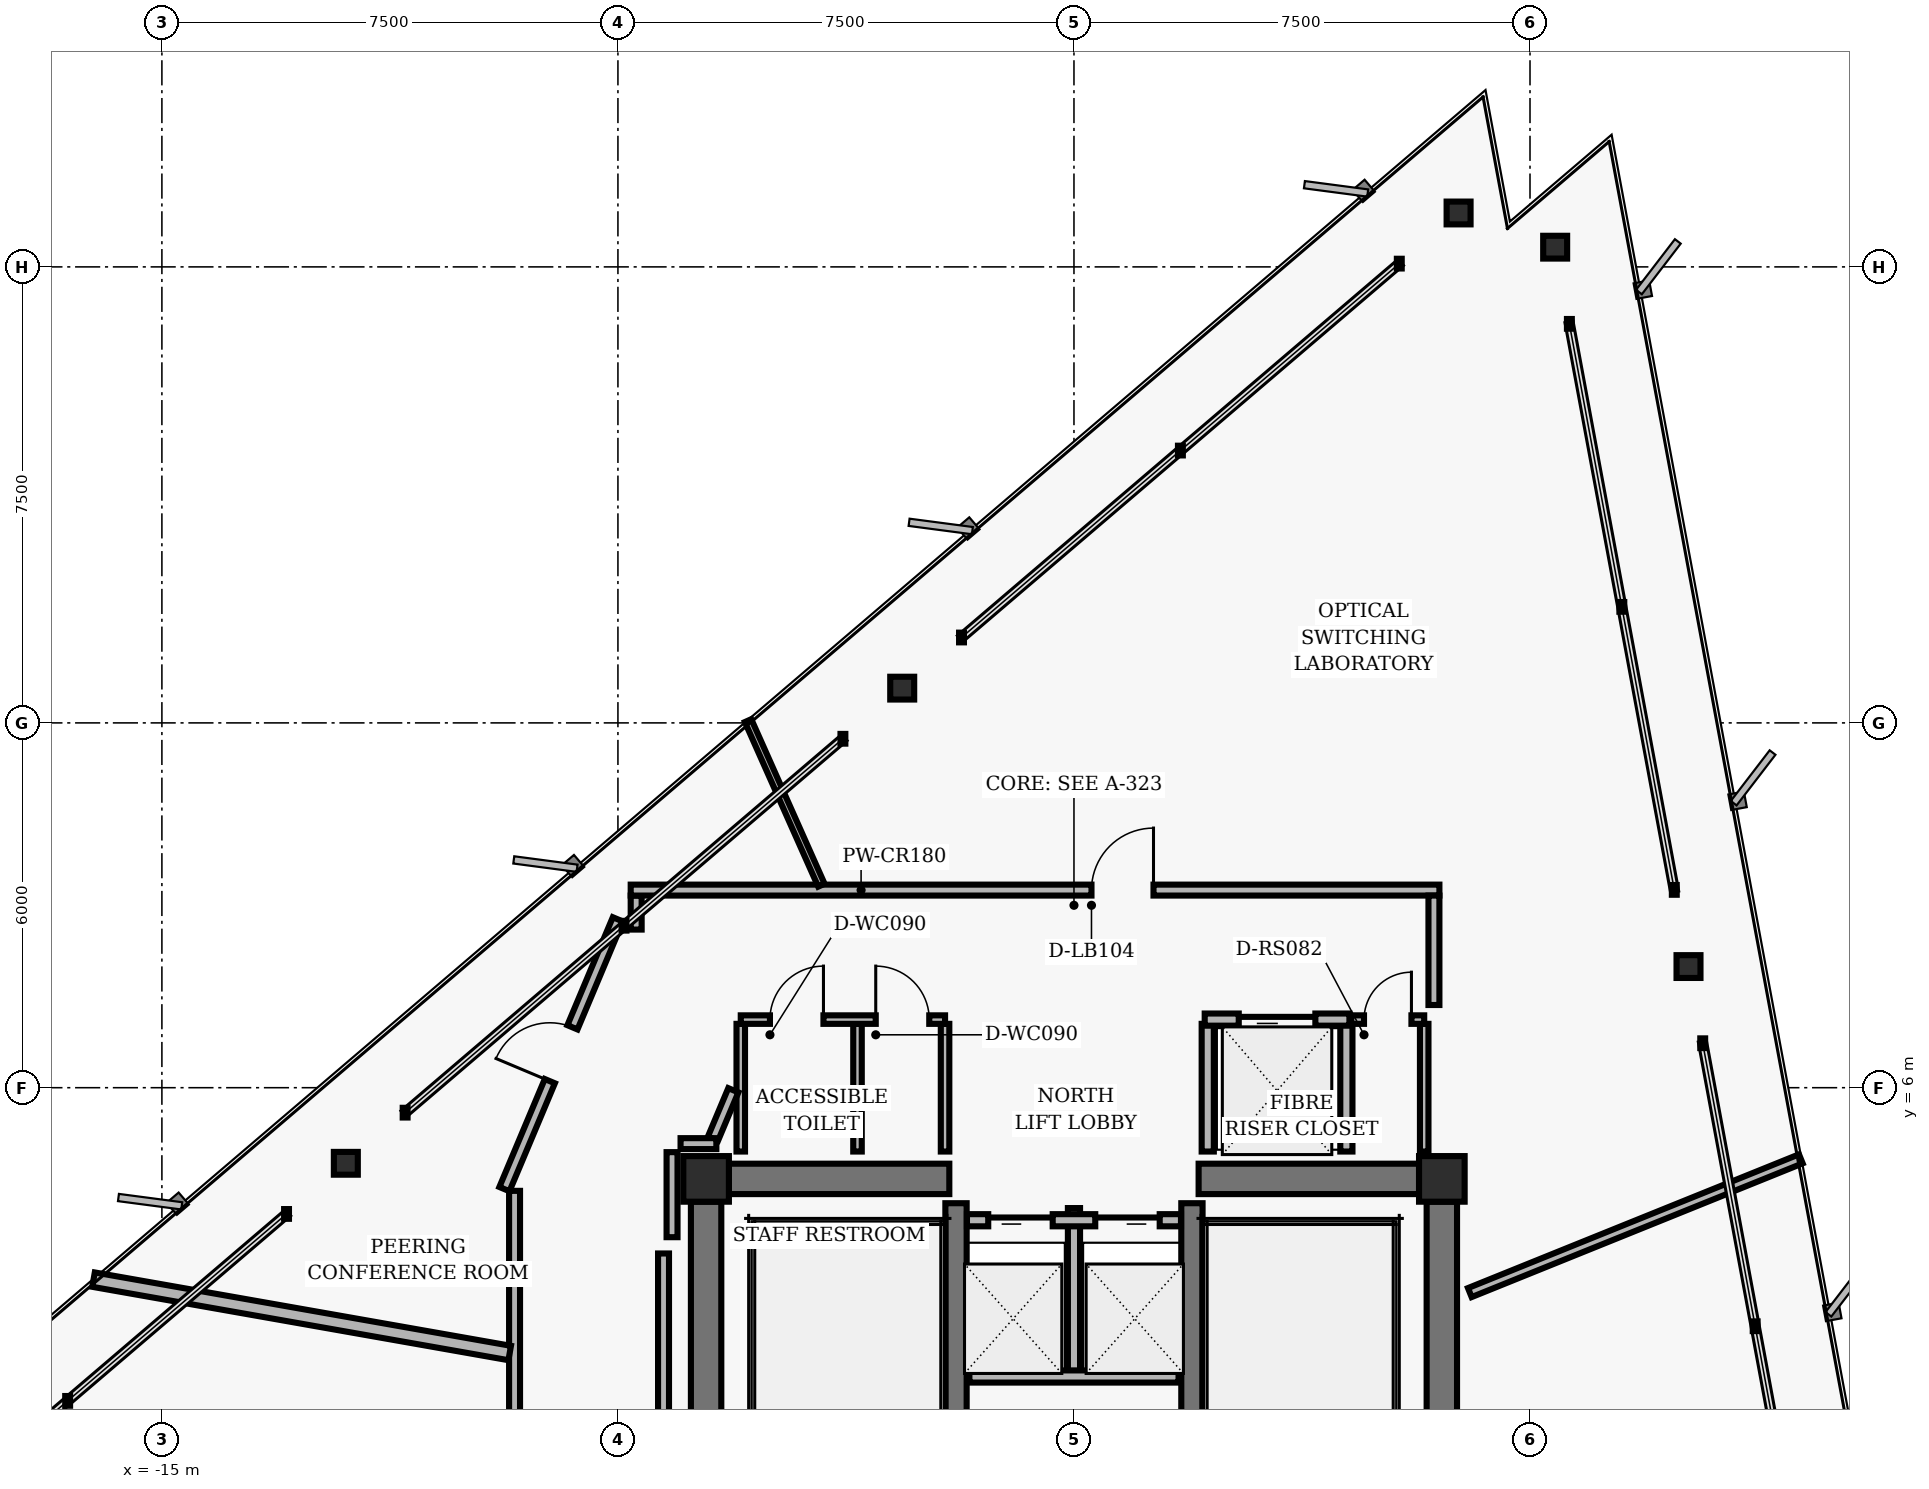
"""IFC4 building model, lengths in metres.
Left out: names, types, materials, properties, quantities, classifications, styles, units other than length and angle.
Written with IfcOpenShell. Run it as: python <this file> out.ifc"""

import sys

from ifc_helpers import new_model, si_unit, direction, frame, frame_2d, origin, origin_2d, place, context, subcontext, project, spatial, rectangle, hollow_rectangle, i_section, extrude, element, fill, save


model = new_model("IFC4")
c1 = context("Model", 3, precision=1e-05, world=origin(), true_north=direction((0.0, 1.0)))
c2 = subcontext(c1, "Body", "Model", "MODEL_VIEW")
j1 = project(units=[si_unit("LENGTHUNIT", "METRE"), si_unit("PLANEANGLEUNIT", "RADIAN")], contexts=[c1])
p1 = place(None, origin())
s1 = spatial("IfcSite", under=j1, at=p1, CompositionType="ELEMENT")
p2 = place(p1, origin())
s2 = spatial("IfcBuilding", under=s1, at=p2, CompositionType="ELEMENT")
p3 = place(p2, frame((0.0, 0.0, 190.56)))
s3 = spatial("IfcBuildingStorey", under=s2, at=p3, CompositionType="ELEMENT", Elevation=190.56)
for number, where, z_axis, x_axis in (
    (1, (-6.05, 4.5, 0.0), (0.0, 0.0, 1.0), (1.0, 0.0, 0.0)),
    (2, (6.05, 4.5, 0.0), (0.0, 0.0, 1.0), (1.0, 0.0, 0.0)),
):
    element("IfcColumn", number, at=place(p3, frame(where, z_axis=z_axis, x_axis=x_axis)), inside=s3, PredefinedType="COLUMN", context=c2, shape_type="SweptSolid", body=[
        extrude(hollow_rectangle(XDim=0.75, YDim=0.75, WallThickness=0.05, InnerFilletRadius=0.02, OuterFilletRadius=0.04, at=origin_2d()), origin(), (0.0, 0.0, 1.0), 3.04),
    ])
for number, where, z_axis, x_axis in (
    (3, (-6.05, 0.375, 0.0), (0.0, 0.0, 1.0), (0.0, 1.0, 0.0)),
    (4, (6.05, 0.375, 0.0), (0.0, 0.0, 1.0), (0.0, 1.0, 0.0)),
):
    element("IfcWall", number, at=place(p3, frame(where, z_axis=z_axis, x_axis=x_axis)), inside=s3, PredefinedType="SHEAR", context=c2, shape_type="SweptSolid", body=[
        extrude(rectangle(XDim=3.75, YDim=0.5, at=frame_2d((1.875, 0.0))), origin(), (0.0, 0.0, 1.0), 2.618),
    ])
for number, where, z_axis, x_axis in (
    (5, (-1.94, -4.1, 0.0), (0.0, 0.0, 1.0), (0.0, 1.0, 0.0)),
    (6, (1.94, -4.1, 0.0), (0.0, 0.0, 1.0), (0.0, 1.0, 0.0)),
):
    element("IfcWall", number, at=place(p3, frame(where, z_axis=z_axis, x_axis=x_axis)), inside=s3, PredefinedType="SHEAR", context=c2, shape_type="SweptSolid", body=[
        extrude(rectangle(XDim=8.2, YDim=0.35, at=frame_2d((4.1, 0.0))), origin(), (0.0, 0.0, 1.0), 2.618),
    ])
for number, where, z_axis, x_axis in (
    (7, (-5.675, 4.5, 0.0), (0.0, 0.0, 1.0), (1.0, 0.0, 0.0)),
    (8, (2.05, 4.5, 0.0), (0.0, 0.0, 1.0), (1.0, 0.0, 0.0)),
):
    element("IfcWall", number, at=place(p3, frame(where, z_axis=z_axis, x_axis=x_axis)), inside=s3, PredefinedType="SHEAR", context=c2, shape_type="SweptSolid", body=[
        extrude(rectangle(XDim=3.625, YDim=0.5, at=frame_2d((1.812, 0.0))), origin(), (0.0, 0.0, 1.0), 2.618),
    ])
for number, where, z_axis, x_axis in (
    (9, (10.107, 7.992, 0.0), (0.0, 0.0, 1.0), (1.0, 0.0, 0.0)),
    (10, (7.914, 19.824, 0.0), (0.0, 0.0, 1.0), (1.0, 0.0, 0.0)),
    (11, (6.325, 20.387, 0.0), (0.0, 0.0, 1.0), (1.0, 0.0, 0.0)),
    (12, (-2.825, 12.572, 0.0), (0.0, 0.0, 1.0), (1.0, 0.0, 0.0)),
    (13, (-11.975, 4.757, 0.0), (0.0, 0.0, 1.0), (1.0, 0.0, 0.0)),
):
    element("IfcColumn", number, at=place(p3, frame(where, z_axis=z_axis, x_axis=x_axis)), inside=s3, PredefinedType="COLUMN", context=c2, shape_type="SweptSolid", body=[
        extrude(i_section(OverallWidth=0.394, OverallDepth=0.375, WebThickness=0.017, FlangeThickness=0.028, FilletRadius=0.016, at=origin_2d()), origin(), (0.0, 0.0, 1.0), 3.04),
    ])
p4 = place(p3, frame((0.0, 1.25, 0.0), z_axis=(0.0, 0.0, 1.0), x_axis=(0.0, 1.0, 0.0)))
e14 = element("IfcWall", 14, at=p4, inside=s3, PredefinedType="PARTITIONING", context=c2, shape_type="SweptSolid", body=[
    extrude(rectangle(XDim=2.77, YDim=0.2, at=frame_2d((1.385, 0.0))), origin(), (0.0, 0.0, 1.0), 2.593),
])
p5 = place(p3, frame((-1.72, 1.25, 0.0), z_axis=(0.0, 0.0, 1.0), x_axis=(1.0, 0.0, 0.0)))
e15 = element("IfcWall", 15, at=p5, inside=s3, PredefinedType="PARTITIONING", context=c2, shape_type="SweptSolid", body=[
    extrude(rectangle(XDim=3.44, YDim=0.2, at=frame_2d((1.72, 0.0))), origin(), (0.0, 0.0, 1.0), 2.593),
])
p6 = place(p3, frame((-1.76, 3.82, 0.0), z_axis=(0.0, 0.0, 1.0), x_axis=(1.0, 0.0, 0.0)))
e16 = element("IfcWall", 16, at=p6, inside=s3, PredefinedType="PARTITIONING", context=c2, shape_type="SweptSolid", body=[
    extrude(rectangle(XDim=3.52, YDim=0.2, at=frame_2d((1.76, 0.0))), origin(), (0.0, 0.0, 1.0), 2.593),
])
p7 = place(p6, frame((0.35, 0.0, 0.0)))
e17 = element("IfcOpeningElement", 17, at=p7, cuts=e16, PredefinedType="OPENING", context=c2, shape_type="SweptSolid", body=[
    extrude(rectangle(XDim=1.06, YDim=2.04, at=frame_2d((0.53, 1.02))), frame((0.0, 0.11, 0.0), z_axis=(0.0, -1.0, 0.0), x_axis=(1.0, 0.0, 0.0)), (0.0, 0.0, 1.0), 0.22),
])
p8 = place(p6, frame((2.11, 0.0, 0.0)))
e18 = element("IfcOpeningElement", 18, at=p8, cuts=e16, PredefinedType="OPENING", context=c2, shape_type="SweptSolid", body=[
    extrude(rectangle(XDim=1.06, YDim=2.04, at=frame_2d((0.53, 1.02))), frame((0.0, 0.11, 0.0), z_axis=(0.0, -1.0, 0.0), x_axis=(1.0, 0.0, 0.0)), (0.0, 0.0, 1.0), 0.22),
])
for number, where, z_axis, x_axis in (
    (19, (2.2, 4.95, 0.0), (0.0, 0.0, 1.0), (0.0, 1.0, 0.0)),
    (20, (4.48, 4.95, 0.0), (0.0, 0.0, 1.0), (0.0, 1.0, 0.0)),
):
    element("IfcWall", number, at=place(p3, frame(where, z_axis=z_axis, x_axis=x_axis)), inside=s3, PredefinedType="PARTITIONING", context=c2, shape_type="SweptSolid", body=[
        extrude(rectangle(XDim=2.1, YDim=0.2, at=frame_2d((1.05, 0.0))), origin(), (0.0, 0.0, 1.0), 2.593),
    ])
p9 = place(p3, frame((2.15, 7.12, 0.0), z_axis=(0.0, 0.0, 1.0), x_axis=(1.0, 0.0, 0.0)))
e21 = element("IfcWall", 21, at=p9, inside=s3, PredefinedType="PARTITIONING", context=c2, shape_type="SweptSolid", body=[
    extrude(rectangle(XDim=2.38, YDim=0.2, at=frame_2d((1.19, 0.0))), origin(), (0.0, 0.0, 1.0), 2.593),
])
p10 = place(p9, frame((0.56, 0.0, 0.0)))
e22 = element("IfcOpeningElement", 22, at=p10, cuts=e21, PredefinedType="OPENING", context=c2, shape_type="SweptSolid", body=[
    extrude(rectangle(XDim=1.26, YDim=2.06, at=frame_2d((0.63, 1.03))), frame((0.0, 0.11, 0.0), z_axis=(0.0, -1.0, 0.0), x_axis=(1.0, 0.0, 0.0)), (0.0, 0.0, 1.0), 0.22),
])
for number, where, z_axis, x_axis in (
    (23, (-5.48, 4.95, 0.0), (0.0, 0.0, 1.0), (0.0, 1.0, 0.0)),
    (24, (-3.56, 4.95, 0.0), (0.0, 0.0, 1.0), (0.0, 1.0, 0.0)),
    (25, (-2.12, 4.95, 0.0), (0.0, 0.0, 1.0), (0.0, 1.0, 0.0)),
):
    element("IfcWall", number, at=place(p3, frame(where, z_axis=z_axis, x_axis=x_axis)), inside=s3, PredefinedType="PARTITIONING", context=c2, shape_type="SweptSolid", body=[
        extrude(rectangle(XDim=2.1, YDim=0.14, at=frame_2d((1.05, 0.0))), origin(), (0.0, 0.0, 1.0), 2.593),
    ])
p11 = place(p3, frame((-5.48, 7.12, 0.0), z_axis=(0.0, 0.0, 1.0), x_axis=(1.0, 0.0, 0.0)))
e26 = element("IfcWall", 26, at=p11, inside=s3, PredefinedType="PARTITIONING", context=c2, shape_type="SweptSolid", body=[
    extrude(rectangle(XDim=3.36, YDim=0.14, at=frame_2d((1.68, 0.0))), origin(), (0.0, 0.0, 1.0), 2.593),
])
p12 = place(p11, frame((0.48, 0.0, 0.0)))
e27 = element("IfcOpeningElement", 27, at=p12, cuts=e26, PredefinedType="OPENING", context=c2, shape_type="SweptSolid", body=[
    extrude(rectangle(XDim=0.88, YDim=2.02, at=frame_2d((0.44, 1.01))), frame((0.0, 0.08, 0.0), z_axis=(0.0, -1.0, 0.0), x_axis=(1.0, 0.0, 0.0)), (0.0, 0.0, 1.0), 0.16),
])
p13 = place(p11, frame((2.22, 0.0, 0.0)))
e28 = element("IfcOpeningElement", 28, at=p13, cuts=e26, PredefinedType="OPENING", context=c2, shape_type="SweptSolid", body=[
    extrude(rectangle(XDim=0.88, YDim=2.02, at=frame_2d((0.44, 1.01))), frame((0.0, 0.08, 0.0), z_axis=(0.0, -1.0, 0.0), x_axis=(1.0, 0.0, 0.0)), (0.0, 0.0, 1.0), 0.16),
])
p14 = place(p3, frame((5.76, 4.95, 0.0), z_axis=(0.0, 0.0, 1.0), x_axis=(0.0, 1.0, 0.0)))
e29 = element("IfcWall", 29, at=p14, inside=s3, PredefinedType="PARTITIONING", context=c2, shape_type="SweptSolid", body=[
    extrude(rectangle(XDim=2.1, YDim=0.14, at=frame_2d((1.05, 0.0))), origin(), (0.0, 0.0, 1.0), 2.073),
])
p15 = place(p3, frame((4.56, 7.12, 0.0), z_axis=(0.0, 0.0, 1.0), x_axis=(1.0, 0.0, 0.0)))
e30 = element("IfcWall", 30, at=p15, inside=s3, PredefinedType="PARTITIONING", context=c2, shape_type="SweptSolid", body=[
    extrude(rectangle(XDim=1.2, YDim=0.14, at=frame_2d((0.6, 0.0))), origin(), (0.0, 0.0, 1.0), 2.593),
])
p16 = place(p15, frame((0.21, 0.0, 0.0)))
e31 = element("IfcOpeningElement", 31, at=p16, cuts=e30, PredefinedType="OPENING", context=c2, shape_type="SweptSolid", body=[
    extrude(rectangle(XDim=0.78, YDim=2.01, at=frame_2d((0.39, 1.005))), frame((0.0, 0.08, 0.0), z_axis=(0.0, -1.0, 0.0), x_axis=(1.0, 0.0, 0.0)), (0.0, 0.0, 1.0), 0.16),
])
p17 = place(p3, frame((-9.2, -4.303, 0.0), z_axis=(0.0, 0.0, 1.0), x_axis=(0.0, 1.0, 0.0)))
e32 = element("IfcWall", 32, at=p17, inside=s3, PredefinedType="PARTITIONING", context=c2, shape_type="SweptSolid", body=[
    extrude(rectangle(XDim=8.607, YDim=0.18, at=frame_2d((4.303, 0.0))), origin(), (0.0, 0.0, 1.0), 2.593),
])
p18 = place(p17, frame((2.619, 0.0, 0.0)))
e33 = element("IfcOpeningElement", 33, at=p18, cuts=e32, PredefinedType="OPENING", context=c2, shape_type="SweptSolid", body=[
    extrude(rectangle(XDim=0.96, YDim=2.02, at=frame_2d((0.48, 1.01))), frame((0.0, 0.1, 0.0), z_axis=(0.0, -1.0, 0.0), x_axis=(1.0, 0.0, 0.0)), (0.0, 0.0, 1.0), 0.2),
])
p19 = place(p3, frame((-9.367, 4.332, 0.0), z_axis=(0.0, 0.0, 1.0), x_axis=(0.387573945081, 0.921838617706, 0.0)))
e34 = element("IfcWall", 34, at=p19, inside=s3, PredefinedType="PARTITIONING", context=c2, shape_type="SweptSolid", body=[
    extrude(rectangle(XDim=4.813, YDim=0.18, at=frame_2d((2.407, 0.0))), origin(), (0.0, 0.0, 1.0), 2.215),
])
p20 = place(p19, frame((1.927, 0.0, 0.0)))
e35 = element("IfcOpeningElement", 35, at=p20, cuts=e34, PredefinedType="OPENING", context=c2, shape_type="SweptSolid", body=[
    extrude(rectangle(XDim=0.96, YDim=2.02, at=frame_2d((0.48, 1.01))), frame((0.0, 0.1, 0.0), z_axis=(0.0, -1.0, 0.0), x_axis=(1.0, 0.0, 0.0)), (0.0, 0.0, 1.0), 0.2),
])
p21 = place(p3, frame((-7.2, 8.601, 0.0), z_axis=(0.0, 0.0, 1.0), x_axis=(0.0, 1.0, 0.0)))
e36 = element("IfcWall", 36, at=p21, inside=s3, PredefinedType="PARTITIONING", context=c2, shape_type="SweptSolid", body=[
    extrude(rectangle(XDim=0.559, YDim=0.18, at=frame_2d((0.28, 0.0))), origin(), (0.0, 0.0, 1.0), 2.593),
])
p22 = place(p3, frame((-7.29, 9.25, 0.0), z_axis=(0.0, 0.0, 1.0), x_axis=(1.0, 0.0, 0.0)))
e37 = element("IfcWall", 37, at=p22, inside=s3, PredefinedType="PARTITIONING", context=c2, shape_type="SweptSolid", body=[
    extrude(rectangle(XDim=13.3, YDim=0.18, at=frame_2d((6.65, 0.0))), origin(), (0.0, 0.0, 1.0), 2.593),
])
p23 = place(p22, frame((7.578, 0.0, 0.0)))
e38 = element("IfcOpeningElement", 38, at=p23, cuts=e37, PredefinedType="OPENING", context=c2, shape_type="SweptSolid", body=[
    extrude(rectangle(XDim=1.02, YDim=2.02, at=frame_2d((0.51, 1.01))), frame((0.0, 0.1, 0.0), z_axis=(0.0, -1.0, 0.0), x_axis=(1.0, 0.0, 0.0)), (0.0, 0.0, 1.0), 0.2),
])
p24 = place(p3, frame((5.92, 9.16, 0.0), z_axis=(0.0, 0.0, 1.0), x_axis=(0.0, -1.0, 0.0)))
e39 = element("IfcWall", 39, at=p24, inside=s3, PredefinedType="PARTITIONING", context=c2, shape_type="SweptSolid", body=[
    extrude(rectangle(XDim=1.8, YDim=0.18, at=frame_2d((0.9, 0.0))), origin(), (0.0, 0.0, 1.0), 2.073),
])
p25 = place(p3, frame((-5.602, 5.958, 0.0), z_axis=(0.0, 0.0, 1.0), x_axis=(-0.387588639363, -0.921832439566, 0.0)))
e40 = element("IfcWall", 40, at=p25, inside=s3, PredefinedType="PARTITIONING", context=c2, shape_type="SweptSolid", body=[
    extrude(rectangle(XDim=0.862, YDim=0.18, at=frame_2d((0.431, 0.0))), origin(), (0.0, 0.0, 1.0), 2.593),
])
p26 = place(p3, frame((-5.881, 5.08, 0.0), z_axis=(0.0, 0.0, 1.0), x_axis=(-1.0, 0.0, 0.0)))
e41 = element("IfcWall", 41, at=p26, inside=s3, PredefinedType="PARTITIONING", context=c2, shape_type="SweptSolid", body=[
    extrude(rectangle(XDim=0.589, YDim=0.18, at=frame_2d((0.294, 0.0))), origin(), (0.0, 0.0, 1.0), 2.593),
])
p27 = place(p3, frame((-6.61, 4.94, 0.0), z_axis=(0.0, 0.0, 1.0), x_axis=(0.0, -1.0, 0.0)))
e42 = element("IfcWall", 42, at=p27, inside=s3, PredefinedType="PARTITIONING", context=c2, shape_type="SweptSolid", body=[
    extrude(rectangle(XDim=1.399, YDim=0.18, at=frame_2d((0.699, 0.0))), origin(), (0.0, 0.0, 1.0), 2.593),
])
p28 = place(p3, frame((-6.75, 3.273, 0.0), z_axis=(0.0, 0.0, 1.0), x_axis=(0.0, -1.0, 0.0)))
e43 = element("IfcWall", 43, at=p28, inside=s3, PredefinedType="PARTITIONING", context=c2, shape_type="SweptSolid", body=[
    extrude(rectangle(XDim=6.547, YDim=0.18, at=frame_2d((3.273, 0.0))), origin(), (0.0, 0.0, 1.0), 2.593),
])
p29 = place(p3, frame((6.51, 2.63, 0.0), z_axis=(0.0, 0.0, 1.0), x_axis=(0.927189354085, 0.374592981342, 0.0)))
e44 = element("IfcWall", 44, at=p29, inside=s3, PredefinedType="PARTITIONING", context=c2, shape_type="SweptSolid", body=[
    extrude(rectangle(XDim=5.872, YDim=0.16, at=frame_2d((2.936, 0.0))), origin(), (0.0, 0.0, 1.0), 2.593),
])
p30 = place(p3, frame((-4.154, 9.33, 0.0), z_axis=(0.0, 0.0, 1.0), x_axis=(-0.406726956158, 0.913549770475, 0.0)))
e45 = element("IfcWall", 45, at=p30, inside=s3, PredefinedType="MOVABLE", context=c2, shape_type="SweptSolid", body=[
    extrude(rectangle(XDim=2.963, YDim=0.115, at=frame_2d((1.482, 0.0))), origin(), (0.0, 0.0, 1.0), 2.593),
])
p31 = place(p3, frame((-9.28, 1.636, 0.0), z_axis=(0.0, 0.0, 1.0), x_axis=(-0.984803709336, 0.173671108934, 0.0)))
e46 = element("IfcWall", 46, at=p31, inside=s3, PredefinedType="PARTITIONING", context=c2, shape_type="SweptSolid", body=[
    extrude(rectangle(XDim=6.95, YDim=0.24, at=frame_2d((3.475, 0.0))), origin(), (0.0, 0.0, 1.0), 2.593),
])
p32 = place(p7, origin())
e47 = element("IfcDoor", 47, at=p32, inside=s3, OperationType="SLIDING_TO_LEFT", PredefinedType="DOOR", context=c2, shape_type="SweptSolid", body=[
    extrude(rectangle(XDim=1.06, YDim=2.04, at=frame_2d((0.53, 1.02))), frame((0.0, 0.025, 0.0), z_axis=(0.0, -1.0, 0.0), x_axis=(1.0, 0.0, 0.0)), (0.0, 0.0, 1.0), 0.05),
])
fill(e17, e47)
p33 = place(p8, origin())
e48 = element("IfcDoor", 48, at=p33, inside=s3, OperationType="SLIDING_TO_RIGHT", PredefinedType="DOOR", context=c2, shape_type="SweptSolid", body=[
    extrude(rectangle(XDim=1.06, YDim=2.04, at=frame_2d((0.53, 1.02))), frame((0.0, 0.025, 0.0), z_axis=(0.0, -1.0, 0.0), x_axis=(1.0, 0.0, 0.0)), (0.0, 0.0, 1.0), 0.05),
])
fill(e18, e48)
p34 = place(p10, origin())
e49 = element("IfcDoor", 49, at=p34, inside=s3, OperationType="SLIDING_TO_LEFT", PredefinedType="DOOR", context=c2, shape_type="SweptSolid", body=[
    extrude(rectangle(XDim=1.26, YDim=2.06, at=frame_2d((0.63, 1.03))), frame((0.0, 0.025, 0.0), z_axis=(0.0, -1.0, 0.0), x_axis=(1.0, 0.0, 0.0)), (0.0, 0.0, 1.0), 0.05),
])
fill(e22, e49)
p35 = place(p12, origin())
e50 = element("IfcDoor", 50, at=p35, inside=s3, OperationType="SINGLE_SWING_RIGHT", PredefinedType="DOOR", context=c2, shape_type="SweptSolid", body=[
    extrude(rectangle(XDim=0.88, YDim=2.02, at=frame_2d((0.44, 1.01))), frame((0.0, 0.025, 0.0), z_axis=(0.0, -1.0, 0.0), x_axis=(1.0, 0.0, 0.0)), (0.0, 0.0, 1.0), 0.05),
])
fill(e27, e50)
p36 = place(p13, origin())
e51 = element("IfcDoor", 51, at=p36, inside=s3, OperationType="SINGLE_SWING_LEFT", PredefinedType="DOOR", context=c2, shape_type="SweptSolid", body=[
    extrude(rectangle(XDim=0.88, YDim=2.02, at=frame_2d((0.44, 1.01))), frame((0.0, 0.025, 0.0), z_axis=(0.0, -1.0, 0.0), x_axis=(1.0, 0.0, 0.0)), (0.0, 0.0, 1.0), 0.05),
])
fill(e28, e51)
p37 = place(p16, origin())
e52 = element("IfcDoor", 52, at=p37, inside=s3, OperationType="SINGLE_SWING_RIGHT", PredefinedType="DOOR", context=c2, shape_type="SweptSolid", body=[
    extrude(rectangle(XDim=0.78, YDim=2.01, at=frame_2d((0.39, 1.005))), frame((0.0, 0.025, 0.0), z_axis=(0.0, -1.0, 0.0), x_axis=(1.0, 0.0, 0.0)), (0.0, 0.0, 1.0), 0.05),
])
fill(e31, e52)
p38 = place(p23, origin())
e53 = element("IfcDoor", 53, at=p38, inside=s3, OperationType="SINGLE_SWING_RIGHT", PredefinedType="DOOR", context=c2, shape_type="SweptSolid", body=[
    extrude(rectangle(XDim=1.02, YDim=2.02, at=frame_2d((0.51, 1.01))), frame((0.0, 0.025, 0.0), z_axis=(0.0, -1.0, 0.0), x_axis=(1.0, 0.0, 0.0)), (0.0, 0.0, 1.0), 0.05),
])
fill(e38, e53)
p39 = place(p20, origin())
e54 = element("IfcDoor", 54, at=p39, inside=s3, OperationType="SINGLE_SWING_LEFT", PredefinedType="DOOR", context=c2, shape_type="SweptSolid", body=[
    extrude(rectangle(XDim=0.96, YDim=2.02, at=frame_2d((0.48, 1.01))), frame((0.0, 0.025, 0.0), z_axis=(0.0, -1.0, 0.0), x_axis=(1.0, 0.0, 0.0)), (0.0, 0.0, 1.0), 0.05),
])
fill(e35, e54)
save(model, sys.argv[1])
